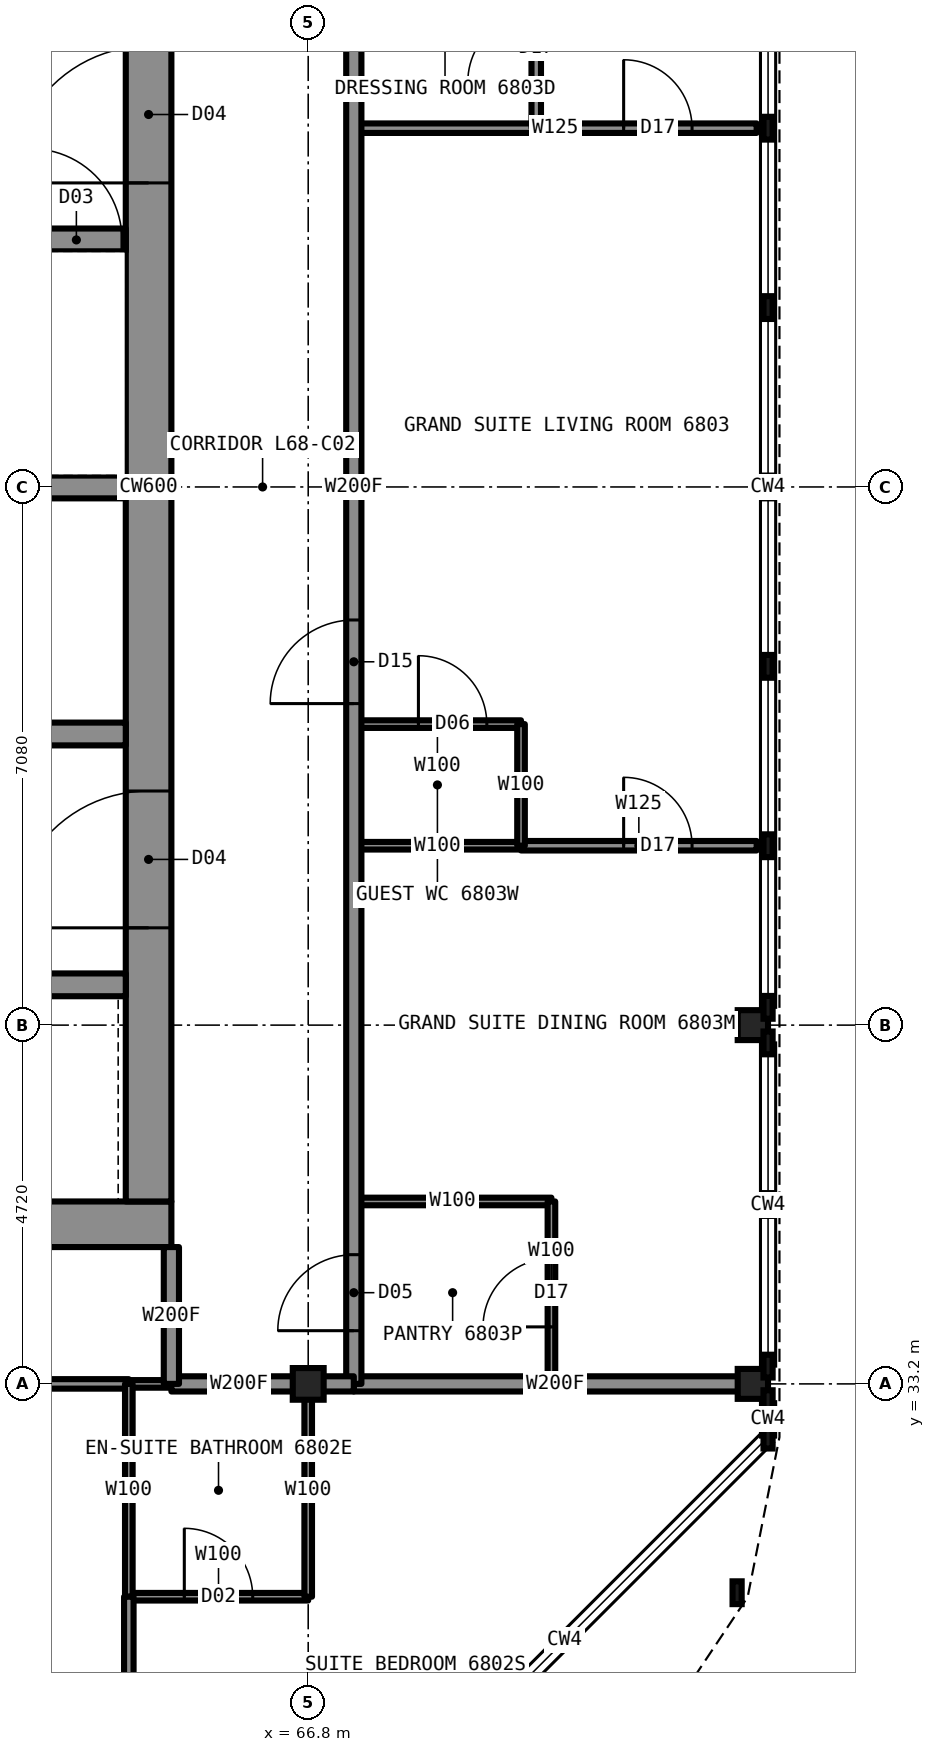
"""IFC4 building model, lengths in metres.
Left out: names, types, materials, properties, quantities, classifications, styles, units other than length and angle.
Written with IfcOpenShell. Run it as: python <this file> out.ifc"""

import sys

from ifc_helpers import new_model, si_unit, direction, frame, frame_2d, origin, origin_2d, place, context, subcontext, project, spatial, rectangle, i_section, extrude, element, fill, save


model = new_model("IFC4")
c1 = context("Model", 3, precision=1e-05, world=origin(), true_north=direction((0.0, 1.0)))
c2 = subcontext(c1, "Body", "Model", "MODEL_VIEW")
j1 = project(units=[si_unit("LENGTHUNIT", "METRE"), si_unit("PLANEANGLEUNIT", "RADIAN")], contexts=[c1])
p1 = place(None, origin())
s1 = spatial("IfcSite", under=j1, at=p1, CompositionType="ELEMENT")
p2 = place(p1, origin())
s2 = spatial("IfcBuilding", under=s1, at=p2, CompositionType="ELEMENT")
p3 = place(p2, frame((0.0, 0.0, 247.7)))
s3 = spatial("IfcBuildingStorey", under=s2, at=p3, CompositionType="ELEMENT", Elevation=247.7)
for number, where, z_axis, x_axis in (
    (1, (72.65, 33.2, 0.0), (0.0, 0.0, 1.0), (1.0, 0.0, 0.0)),
    (2, (72.65, 37.92, 0.0), (0.0, 0.0, 1.0), (1.0, 0.0, 0.0)),
):
    element("IfcColumn", number, at=place(p3, frame(where, z_axis=z_axis, x_axis=x_axis)), inside=s3, PredefinedType="COLUMN", context=c2, shape_type="SweptSolid", body=[
        extrude(i_section(OverallWidth=0.399, OverallDepth=0.394, WebThickness=0.023, FlangeThickness=0.037, at=origin_2d()), origin(), (0.0, 0.0, 1.0), 3.5),
    ])
p4 = place(p3, frame((66.8, 33.2, 0.0), z_axis=(0.0, 0.0, 1.0), x_axis=(1.0, 0.0, 0.0)))
e3 = element("IfcColumn", 3, at=p4, inside=s3, PredefinedType="COLUMN", context=c2, shape_type="SweptSolid", body=[
    extrude(i_section(OverallWidth=0.406, OverallDepth=0.417, WebThickness=0.03, FlangeThickness=0.048, at=origin_2d()), origin(), (0.0, 0.0, 1.0), 3.5),
])
p5 = place(p3, frame((45.0, 35.3, 0.0), z_axis=(0.0, 0.0, 1.0), x_axis=(1.0, 0.0, 0.0)))
e4 = element("IfcWall", 4, at=p5, inside=s3, PredefinedType="SHEAR", context=c2, shape_type="SweptSolid", body=[
    extrude(rectangle(XDim=20.0, YDim=0.6, at=frame_2d((10.0, 0.0))), origin(), (0.0, 0.0, 1.0), 3.5),
])
p6 = place(p3, frame((64.7, 35.6, 0.0), z_axis=(0.0, 0.0, 1.0), x_axis=(0.0, 1.0, 0.0)))
e5 = element("IfcWall", 5, at=p6, inside=s3, PredefinedType="SHEAR", context=c2, shape_type="SweptSolid", body=[
    extrude(rectangle(XDim=18.8, YDim=0.6, at=frame_2d((9.4, 0.0))), origin(), (0.0, 0.0, 1.0), 3.5),
])
p7 = place(p6, frame((13.4, 0.0, 0.0)))
e6 = element("IfcOpeningElement", 6, at=p7, cuts=e5, PredefinedType="OPENING", context=c2, shape_type="SweptSolid", body=[
    extrude(rectangle(XDim=1.8, YDim=2.2, at=frame_2d((0.9, 1.1))), frame((0.0, 0.31, 0.0), z_axis=(0.0, -1.0, 0.0), x_axis=(1.0, 0.0, 0.0)), (0.0, 0.0, 1.0), 0.62),
])
p8 = place(p6, frame((3.6, 0.0, 0.0)))
e7 = element("IfcOpeningElement", 7, at=p8, cuts=e5, PredefinedType="OPENING", context=c2, shape_type="SweptSolid", body=[
    extrude(rectangle(XDim=1.8, YDim=2.2, at=frame_2d((0.9, 1.1))), frame((0.0, 0.31, 0.0), z_axis=(0.0, -1.0, 0.0), x_axis=(1.0, 0.0, 0.0)), (0.0, 0.0, 1.0), 0.62),
])
p9 = place(p3, frame((45.6, 38.45, 0.0), z_axis=(0.0, 0.0, 1.0), x_axis=(1.0, 0.0, 0.0)))
e8 = element("IfcWall", 8, at=p9, inside=s3, PredefinedType="SHEAR", context=c2, shape_type="SweptSolid", body=[
    extrude(rectangle(XDim=18.8, YDim=0.3, at=frame_2d((9.4, 0.0))), origin(), (0.0, 0.0, 1.0), 3.5),
])
p10 = place(p9, frame((0.7, 0.0, 0.0)))
e9 = element("IfcOpeningElement", 9, at=p10, cuts=e8, PredefinedType="OPENING", context=c2, shape_type="SweptSolid", body=[
    extrude(rectangle(XDim=1.1, YDim=2.2, at=frame_2d((0.55, 1.1))), frame((0.0, 0.16, 0.0), z_axis=(0.0, -1.0, 0.0), x_axis=(1.0, 0.0, 0.0)), (0.0, 0.0, 1.0), 0.32),
])
p11 = place(p9, frame((3.4, 0.0, 0.0)))
e10 = element("IfcOpeningElement", 10, at=p11, cuts=e8, PredefinedType="OPENING", context=c2, shape_type="SweptSolid", body=[
    extrude(rectangle(XDim=1.1, YDim=2.2, at=frame_2d((0.55, 1.1))), frame((0.0, 0.16, 0.0), z_axis=(0.0, -1.0, 0.0), x_axis=(1.0, 0.0, 0.0)), (0.0, 0.0, 1.0), 0.32),
])
p12 = place(p9, frame((6.1, 0.0, 0.0)))
e11 = element("IfcOpeningElement", 11, at=p12, cuts=e8, PredefinedType="OPENING", context=c2, shape_type="SweptSolid", body=[
    extrude(rectangle(XDim=1.1, YDim=2.2, at=frame_2d((0.55, 1.1))), frame((0.0, 0.16, 0.0), z_axis=(0.0, -1.0, 0.0), x_axis=(1.0, 0.0, 0.0)), (0.0, 0.0, 1.0), 0.32),
])
p13 = place(p9, frame((8.8, 0.0, 0.0)))
e12 = element("IfcOpeningElement", 12, at=p13, cuts=e8, PredefinedType="OPENING", context=c2, shape_type="SweptSolid", body=[
    extrude(rectangle(XDim=1.1, YDim=2.2, at=frame_2d((0.55, 1.1))), frame((0.0, 0.16, 0.0), z_axis=(0.0, -1.0, 0.0), x_axis=(1.0, 0.0, 0.0)), (0.0, 0.0, 1.0), 0.32),
])
p14 = place(p3, frame((56.2, 48.25, 0.0), z_axis=(0.0, 0.0, 1.0), x_axis=(1.0, 0.0, 0.0)))
e13 = element("IfcWall", 13, at=p14, inside=s3, PredefinedType="SHEAR", context=c2, shape_type="SweptSolid", body=[
    extrude(rectangle(XDim=8.2, YDim=0.3, at=frame_2d((4.1, 0.0))), origin(), (0.0, 0.0, 1.0), 3.5),
])
p15 = place(p14, frame((6.95, 0.0, 0.0)))
e14 = element("IfcOpeningElement", 14, at=p15, cuts=e13, PredefinedType="OPENING", context=c2, shape_type="SweptSolid", body=[
    extrude(rectangle(XDim=1.2, YDim=2.2, at=frame_2d((0.6, 1.1))), frame((0.0, 0.16, 0.0), z_axis=(0.0, -1.0, 0.0), x_axis=(1.0, 0.0, 0.0)), (0.0, 0.0, 1.0), 0.32),
])
p16 = place(p3, frame((56.2, 41.75, 0.0), z_axis=(0.0, 0.0, 1.0), x_axis=(1.0, 0.0, 0.0)))
e15 = element("IfcWall", 15, at=p16, inside=s3, PredefinedType="SHEAR", context=c2, shape_type="SweptSolid", body=[
    extrude(rectangle(XDim=8.2, YDim=0.3, at=frame_2d((4.1, 0.0))), origin(), (0.0, 0.0, 1.0), 3.5),
])
p17 = place(p16, frame((3.3, 0.0, 0.0)))
e16 = element("IfcOpeningElement", 16, at=p17, cuts=e15, PredefinedType="OPENING", context=c2, shape_type="SweptSolid", body=[
    extrude(rectangle(XDim=1.0, YDim=2.1, at=frame_2d((0.5, 1.05))), frame((0.0, 0.16, 0.0), z_axis=(0.0, -1.0, 0.0), x_axis=(1.0, 0.0, 0.0)), (0.0, 0.0, 1.0), 0.32),
])
p18 = place(p3, frame((56.5, 45.0, 0.0), z_axis=(0.0, 0.0, 1.0), x_axis=(1.0, 0.0, 0.0)))
e17 = element("IfcWall", 17, at=p18, inside=s3, PredefinedType="SHEAR", context=c2, shape_type="SweptSolid", body=[
    extrude(rectangle(XDim=7.9, YDim=0.3, at=frame_2d((3.95, 0.0))), origin(), (0.0, 0.0, 1.0), 3.5),
])
p19 = place(p3, frame((64.44, 33.2, 0.0), z_axis=(0.0, 0.0, 1.0), x_axis=(1.0, 0.0, 0.0)))
e18 = element("IfcWall", 18, at=p19, inside=s3, PredefinedType="PARTITIONING", context=c2, shape_type="SweptSolid", body=[
    extrude(rectangle(XDim=0.56, YDim=0.1, at=frame_2d((0.28, 0.0))), origin(), (0.0, 0.0, 1.0), 3.33),
])
p20 = place(p3, frame((65.0, 33.2, 0.0), z_axis=(0.0, 0.0, 1.0), x_axis=(1.0, 0.0, 0.0)))
e19 = element("IfcWall", 19, at=p20, inside=s3, PredefinedType="PARTITIONING", context=c2, shape_type="SweptSolid", body=[
    extrude(rectangle(XDim=1.78, YDim=0.2, at=frame_2d((0.89, 0.0))), origin(), (0.0, 0.0, 1.0), 3.33),
])
p21 = place(p3, frame((67.4, 33.2, 0.0), z_axis=(0.0, 0.0, 1.0), x_axis=(1.0, 0.0, 0.0)))
e20 = element("IfcWall", 20, at=p21, inside=s3, PredefinedType="PARTITIONING", context=c2, shape_type="SweptSolid", body=[
    extrude(rectangle(XDim=5.3, YDim=0.2, at=frame_2d((2.65, 0.0))), origin(), (0.0, 0.0, 1.0), 2.573),
])
p22 = place(p3, frame((57.36, 33.2, 0.0), z_axis=(0.0, 0.0, 1.0), x_axis=(1.0, 0.0, 0.0)))
e21 = element("IfcWall", 21, at=p22, inside=s3, PredefinedType="PARTITIONING", context=c2, shape_type="SweptSolid", body=[
    extrude(rectangle(XDim=7.08, YDim=0.125, at=frame_2d((3.54, 0.0))), origin(), (0.0, 0.0, 1.0), 3.33),
])
p23 = place(p3, frame((64.44, 30.4, 0.0), z_axis=(0.0, 0.0, 1.0), x_axis=(1.0, 0.0, 0.0)))
e22 = element("IfcWall", 22, at=p23, inside=s3, PredefinedType="PARTITIONING", context=c2, shape_type="SweptSolid", body=[
    extrude(rectangle(XDim=2.36, YDim=0.1, at=frame_2d((1.18, 0.0))), origin(), (0.0, 0.0, 1.0), 3.33),
])
p24 = place(p23, frame((0.73, 0.0, 0.0)))
e23 = element("IfcOpeningElement", 23, at=p24, cuts=e22, PredefinedType="OPENING", context=c2, shape_type="SweptSolid", body=[
    extrude(rectangle(XDim=0.9, YDim=2.1, at=frame_2d((0.45, 1.05))), frame((0.0, 0.06, 0.0), z_axis=(0.0, -1.0, 0.0), x_axis=(1.0, 0.0, 0.0)), (0.0, 0.0, 1.0), 0.12),
])
p25 = place(p3, frame((67.4, 41.88, 0.0), z_axis=(0.0, 0.0, 1.0), x_axis=(1.0, 0.0, 0.0)))
e24 = element("IfcWall", 24, at=p25, inside=s3, PredefinedType="PARTITIONING", context=c2, shape_type="SweptSolid", body=[
    extrude(rectangle(XDim=2.2, YDim=0.1, at=frame_2d((1.1, 0.0))), origin(), (0.0, 0.0, 1.0), 3.33),
])
p26 = place(p25, frame((0.85, 0.0, 0.0)))
e25 = element("IfcOpeningElement", 25, at=p26, cuts=e24, PredefinedType="OPENING", context=c2, shape_type="SweptSolid", body=[
    extrude(rectangle(XDim=0.9, YDim=2.1, at=frame_2d((0.45, 1.05))), frame((0.0, 0.06, 0.0), z_axis=(0.0, -1.0, 0.0), x_axis=(1.0, 0.0, 0.0)), (0.0, 0.0, 1.0), 0.12),
])
p27 = place(p3, frame((67.4, 40.28, 0.0), z_axis=(0.0, 0.0, 1.0), x_axis=(1.0, 0.0, 0.0)))
e26 = element("IfcWall", 26, at=p27, inside=s3, PredefinedType="PARTITIONING", context=c2, shape_type="SweptSolid", body=[
    extrude(rectangle(XDim=2.2, YDim=0.1, at=frame_2d((1.1, 0.0))), origin(), (0.0, 0.0, 1.0), 2.797),
])
p28 = place(p3, frame((69.6, 40.28, 0.0), z_axis=(0.0, 0.0, 1.0), x_axis=(1.0, 0.0, 0.0)))
e27 = element("IfcWall", 27, at=p28, inside=s3, PredefinedType="PARTITIONING", context=c2, shape_type="SweptSolid", body=[
    extrude(rectangle(XDim=3.1, YDim=0.125, at=frame_2d((1.55, 0.0))), origin(), (0.0, 0.0, 1.0), 2.797),
])
p29 = place(p28, frame((1.35, 0.0, 0.0)))
e28 = element("IfcOpeningElement", 28, at=p29, cuts=e27, PredefinedType="OPENING", context=c2, shape_type="SweptSolid", body=[
    extrude(rectangle(XDim=0.9, YDim=2.2, at=frame_2d((0.45, 1.1))), frame((0.0, 0.073, 0.0), z_axis=(0.0, -1.0, 0.0), x_axis=(1.0, 0.0, 0.0)), (0.0, 0.0, 1.0), 0.145),
])
p30 = place(p3, frame((67.4, 35.6, 0.0), z_axis=(0.0, 0.0, 1.0), x_axis=(1.0, 0.0, 0.0)))
e29 = element("IfcWall", 29, at=p30, inside=s3, PredefinedType="PARTITIONING", context=c2, shape_type="SweptSolid", body=[
    extrude(rectangle(XDim=2.6, YDim=0.1, at=frame_2d((1.3, 0.0))), origin(), (0.0, 0.0, 1.0), 2.797),
])
p31 = place(p3, frame((67.4, 49.72, 0.0), z_axis=(0.0, 0.0, 1.0), x_axis=(1.0, 0.0, 0.0)))
e30 = element("IfcWall", 30, at=p31, inside=s3, PredefinedType="PARTITIONING", context=c2, shape_type="SweptSolid", body=[
    extrude(rectangle(XDim=5.3, YDim=0.125, at=frame_2d((2.65, 0.0))), origin(), (0.0, 0.0, 1.0), 2.797),
])
p32 = place(p31, frame((3.55, 0.0, 0.0)))
e31 = element("IfcOpeningElement", 31, at=p32, cuts=e30, PredefinedType="OPENING", context=c2, shape_type="SweptSolid", body=[
    extrude(rectangle(XDim=0.9, YDim=2.2, at=frame_2d((0.45, 1.1))), frame((0.0, 0.073, 0.0), z_axis=(0.0, -1.0, 0.0), x_axis=(1.0, 0.0, 0.0)), (0.0, 0.0, 1.0), 0.145),
])
p33 = place(p3, frame((65.0, 33.2, 0.0), z_axis=(0.0, 0.0, 1.0), x_axis=(0.0, 1.0, 0.0)))
e32 = element("IfcWall", 32, at=p33, inside=s3, PredefinedType="PARTITIONING", context=c2, shape_type="SweptSolid", body=[
    extrude(rectangle(XDim=1.8, YDim=0.2, at=frame_2d((0.9, 0.0))), origin(), (0.0, 0.0, 1.0), 3.33),
])
p34 = place(p3, frame((66.8, 30.4, 0.0), z_axis=(0.0, 0.0, 1.0), x_axis=(0.0, 1.0, 0.0)))
e33 = element("IfcWall", 33, at=p34, inside=s3, PredefinedType="PARTITIONING", context=c2, shape_type="SweptSolid", body=[
    extrude(rectangle(XDim=2.8, YDim=0.1, at=frame_2d((1.4, 0.0))), origin(), (0.0, 0.0, 1.0), 2.573),
])
p35 = place(p3, frame((67.4, 33.2, 0.0), z_axis=(0.0, 0.0, 1.0), x_axis=(0.0, 1.0, 0.0)))
e34 = element("IfcWall", 34, at=p35, inside=s3, PredefinedType="PARTITIONING", context=c2, shape_type="SweptSolid", body=[
    extrude(rectangle(XDim=23.6, YDim=0.2, at=frame_2d((11.8, 0.0))), origin(), (0.0, 0.0, 1.0), 3.33),
])
p36 = place(p35, frame((8.95, 0.0, 0.0)))
e35 = element("IfcOpeningElement", 35, at=p36, cuts=e34, PredefinedType="OPENING", context=c2, shape_type="SweptSolid", body=[
    extrude(rectangle(XDim=1.1, YDim=2.2, at=frame_2d((0.55, 1.1))), frame((0.0, 0.11, 0.0), z_axis=(0.0, -1.0, 0.0), x_axis=(1.0, 0.0, 0.0)), (0.0, 0.0, 1.0), 0.22),
])
p37 = place(p35, frame((0.7, 0.0, 0.0)))
e36 = element("IfcOpeningElement", 36, at=p37, cuts=e34, PredefinedType="OPENING", context=c2, shape_type="SweptSolid", body=[
    extrude(rectangle(XDim=1.0, YDim=2.1, at=frame_2d((0.5, 1.05))), frame((0.0, 0.11, 0.0), z_axis=(0.0, -1.0, 0.0), x_axis=(1.0, 0.0, 0.0)), (0.0, 0.0, 1.0), 0.22),
])
p38 = place(p3, frame((69.6, 40.28, 0.0), z_axis=(0.0, 0.0, 1.0), x_axis=(0.0, 1.0, 0.0)))
e37 = element("IfcWall", 37, at=p38, inside=s3, PredefinedType="PARTITIONING", context=c2, shape_type="SweptSolid", body=[
    extrude(rectangle(XDim=1.6, YDim=0.1, at=frame_2d((0.8, 0.0))), origin(), (0.0, 0.0, 1.0), 3.33),
])
p39 = place(p3, frame((69.8, 49.72, 0.0), z_axis=(0.0, 0.0, 1.0), x_axis=(0.0, 1.0, 0.0)))
e38 = element("IfcWall", 38, at=p39, inside=s3, PredefinedType="PARTITIONING", context=c2, shape_type="SweptSolid", body=[
    extrude(rectangle(XDim=2.12, YDim=0.125, at=frame_2d((1.06, 0.0))), origin(), (0.0, 0.0, 1.0), 3.33),
])
p40 = place(p39, frame((0.61, 0.0, 0.0)))
e39 = element("IfcOpeningElement", 39, at=p40, cuts=e38, PredefinedType="OPENING", context=c2, shape_type="SweptSolid", body=[
    extrude(rectangle(XDim=0.9, YDim=2.2, at=frame_2d((0.45, 1.1))), frame((0.0, 0.073, 0.0), z_axis=(0.0, -1.0, 0.0), x_axis=(1.0, 0.0, 0.0)), (0.0, 0.0, 1.0), 0.145),
])
p41 = place(p3, frame((70.0, 33.2, 0.0), z_axis=(0.0, 0.0, 1.0), x_axis=(0.0, 1.0, 0.0)))
e40 = element("IfcWall", 40, at=p41, inside=s3, PredefinedType="PARTITIONING", context=c2, shape_type="SweptSolid", body=[
    extrude(rectangle(XDim=2.4, YDim=0.1, at=frame_2d((1.2, 0.0))), origin(), (0.0, 0.0, 1.0), 3.33),
])
p42 = place(p41, frame((0.75, 0.0, 0.0)))
e41 = element("IfcOpeningElement", 41, at=p42, cuts=e40, PredefinedType="OPENING", context=c2, shape_type="SweptSolid", body=[
    extrude(rectangle(XDim=0.9, YDim=2.2, at=frame_2d((0.45, 1.1))), frame((0.0, 0.06, 0.0), z_axis=(0.0, -1.0, 0.0), x_axis=(1.0, 0.0, 0.0)), (0.0, 0.0, 1.0), 0.12),
])
p43 = place(p3, frame((64.44, 30.4, 0.0), z_axis=(0.0, 0.0, 1.0), x_axis=(0.0, 1.0, 0.0)))
e42 = element("IfcWall", 42, at=p43, inside=s3, PredefinedType="PARTITIONING", context=c2, shape_type="SweptSolid", body=[
    extrude(rectangle(XDim=2.8, YDim=0.1, at=frame_2d((1.4, 0.0))), origin(), (0.0, 0.0, 1.0), 3.33),
])
p44 = place(p3, frame((64.44, 27.3, 0.0), z_axis=(0.0, 0.0, 1.0), x_axis=(0.0, 1.0, 0.0)))
e43 = element("IfcWall", 43, at=p44, inside=s3, PredefinedType="PARTITIONING", context=c2, shape_type="SweptSolid", body=[
    extrude(rectangle(XDim=3.1, YDim=0.125, at=frame_2d((1.55, 0.0))), origin(), (0.0, 0.0, 1.0), 3.33),
])
p45 = place(p44, frame((0.95, 0.0, 0.0)))
e44 = element("IfcOpeningElement", 44, at=p45, cuts=e43, PredefinedType="OPENING", context=c2, shape_type="SweptSolid", body=[
    extrude(rectangle(XDim=0.9, YDim=2.2, at=frame_2d((0.45, 1.1))), frame((0.0, 0.073, 0.0), z_axis=(0.0, -1.0, 0.0), x_axis=(1.0, 0.0, 0.0)), (0.0, 0.0, 1.0), 0.145),
])
p46 = place(p3, frame((66.78, 33.2, 0.0), z_axis=(0.0, 0.0, 1.0), x_axis=(1.0, 0.0, 0.0)))
e45 = element("IfcWall", 45, at=p46, inside=s3, PredefinedType="PARTITIONING", context=c2, shape_type="SweptSolid", body=[
    extrude(rectangle(XDim=0.62, YDim=0.2, at=frame_2d((0.31, 0.0))), origin(), (0.0, 0.0, 1.0), 2.573),
])
p47 = place(p24, origin())
e46 = element("IfcDoor", 46, at=p47, inside=s3, OperationType="SINGLE_SWING_RIGHT", PredefinedType="DOOR", context=c2, shape_type="SweptSolid", body=[
    extrude(rectangle(XDim=0.9, YDim=2.1, at=frame_2d((0.45, 1.05))), frame((0.0, 0.025, 0.0), z_axis=(0.0, -1.0, 0.0), x_axis=(1.0, 0.0, 0.0)), (0.0, 0.0, 1.0), 0.05),
])
fill(e23, e46)
p48 = place(p36, origin())
e47 = element("IfcDoor", 47, at=p48, inside=s3, OperationType="SINGLE_SWING_LEFT", PredefinedType="DOOR", context=c2, shape_type="SweptSolid", body=[
    extrude(rectangle(XDim=1.1, YDim=2.2, at=frame_2d((0.55, 1.1))), frame((0.0, 0.025, 0.0), z_axis=(0.0, -1.0, 0.0), x_axis=(1.0, 0.0, 0.0)), (0.0, 0.0, 1.0), 0.05),
])
fill(e35, e47)
p49 = place(p40, origin())
e48 = element("IfcDoor", 48, at=p49, inside=s3, OperationType="SINGLE_SWING_LEFT", PredefinedType="DOOR", context=c2, shape_type="SweptSolid", body=[
    extrude(rectangle(XDim=0.9, YDim=2.2, at=frame_2d((0.45, 1.1))), frame((0.0, 0.025, 0.0), z_axis=(0.0, -1.0, 0.0), x_axis=(1.0, 0.0, 0.0)), (0.0, 0.0, 1.0), 0.05),
])
fill(e39, e48)
p50 = place(p29, origin())
e49 = element("IfcDoor", 49, at=p50, inside=s3, OperationType="SINGLE_SWING_LEFT", PredefinedType="DOOR", context=c2, shape_type="SweptSolid", body=[
    extrude(rectangle(XDim=0.9, YDim=2.2, at=frame_2d((0.45, 1.1))), frame((0.0, 0.025, 0.0), z_axis=(0.0, -1.0, 0.0), x_axis=(1.0, 0.0, 0.0)), (0.0, 0.0, 1.0), 0.05),
])
fill(e28, e49)
p51 = place(p42, origin())
e50 = element("IfcDoor", 50, at=p51, inside=s3, OperationType="SINGLE_SWING_LEFT", PredefinedType="DOOR", context=c2, shape_type="SweptSolid", body=[
    extrude(rectangle(XDim=0.9, YDim=2.2, at=frame_2d((0.45, 1.1))), frame((0.0, 0.025, 0.0), z_axis=(0.0, -1.0, 0.0), x_axis=(1.0, 0.0, 0.0)), (0.0, 0.0, 1.0), 0.05),
])
fill(e41, e50)
p52 = place(p37, origin())
e51 = element("IfcDoor", 51, at=p52, inside=s3, OperationType="SINGLE_SWING_LEFT", PredefinedType="DOOR", context=c2, shape_type="SweptSolid", body=[
    extrude(rectangle(XDim=1.0, YDim=2.1, at=frame_2d((0.5, 1.05))), frame((0.0, 0.025, 0.0), z_axis=(0.0, -1.0, 0.0), x_axis=(1.0, 0.0, 0.0)), (0.0, 0.0, 1.0), 0.05),
])
fill(e36, e51)
p53 = place(p32, origin())
e52 = element("IfcDoor", 52, at=p53, inside=s3, OperationType="SINGLE_SWING_LEFT", PredefinedType="DOOR", context=c2, shape_type="SweptSolid", body=[
    extrude(rectangle(XDim=0.9, YDim=2.2, at=frame_2d((0.45, 1.1))), frame((0.0, 0.025, 0.0), z_axis=(0.0, -1.0, 0.0), x_axis=(1.0, 0.0, 0.0)), (0.0, 0.0, 1.0), 0.05),
])
fill(e31, e52)
p54 = place(p26, origin())
e53 = element("IfcDoor", 53, at=p54, inside=s3, OperationType="SINGLE_SWING_LEFT", PredefinedType="DOOR", context=c2, shape_type="SweptSolid", body=[
    extrude(rectangle(XDim=0.9, YDim=2.1, at=frame_2d((0.45, 1.05))), frame((0.0, 0.025, 0.0), z_axis=(0.0, -1.0, 0.0), x_axis=(1.0, 0.0, 0.0)), (0.0, 0.0, 1.0), 0.05),
])
fill(e25, e53)
p55 = place(p7, origin())
e54 = element("IfcDoor", 54, at=p55, inside=s3, OperationType="DOUBLE_DOOR_SINGLE_SWING", PredefinedType="DOOR", context=c2, shape_type="SweptSolid", body=[
    extrude(rectangle(XDim=1.8, YDim=2.2, at=frame_2d((0.9, 1.1))), frame((0.0, 0.025, 0.0), z_axis=(0.0, -1.0, 0.0), x_axis=(1.0, 0.0, 0.0)), (0.0, 0.0, 1.0), 0.05),
])
fill(e6, e54)
p56 = place(p8, origin())
e55 = element("IfcDoor", 55, at=p56, inside=s3, OperationType="DOUBLE_DOOR_SINGLE_SWING", PredefinedType="DOOR", context=c2, shape_type="SweptSolid", body=[
    extrude(rectangle(XDim=1.8, YDim=2.2, at=frame_2d((0.9, 1.1))), frame((0.0, 0.025, 0.0), z_axis=(0.0, -1.0, 0.0), x_axis=(1.0, 0.0, 0.0)), (0.0, 0.0, 1.0), 0.05),
])
fill(e7, e55)
p57 = place(p15, origin())
e56 = element("IfcDoor", 56, at=p57, inside=s3, OperationType="SINGLE_SWING_LEFT", PredefinedType="DOOR", context=c2, shape_type="SweptSolid", body=[
    extrude(rectangle(XDim=1.2, YDim=2.2, at=frame_2d((0.6, 1.1))), frame((0.0, 0.025, 0.0), z_axis=(0.0, -1.0, 0.0), x_axis=(1.0, 0.0, 0.0)), (0.0, 0.0, 1.0), 0.05),
])
fill(e14, e56)
save(model, sys.argv[1])
